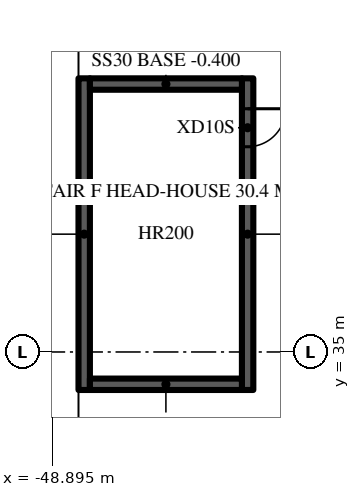
"""IFC4 building model, lengths in metres.
Left out: names, types, materials, properties, quantities, classifications, styles, units other than length and angle.
Written with IfcOpenShell. Run it as: python <this file> out.ifc"""

import sys

from ifc_helpers import new_model, si_unit, direction, frame, frame_2d, origin, place, context, subcontext, project, spatial, rectangle, extrude, element, fill, save


model = new_model("IFC4")
c1 = context("Model", 3, precision=1e-05, world=origin(), true_north=direction((0.0, 1.0)))
c2 = subcontext(c1, "Body", "Model", "MODEL_VIEW")
j1 = project(units=[si_unit("LENGTHUNIT", "METRE"), si_unit("PLANEANGLEUNIT", "RADIAN")], contexts=[c1])
p1 = place(None, origin())
s1 = spatial("IfcSite", under=j1, at=p1, CompositionType="ELEMENT")
p2 = place(p1, origin())
s2 = spatial("IfcBuilding", under=s1, at=p2, CompositionType="ELEMENT")
p3 = place(p2, origin())
s3 = spatial("IfcBuildingStorey", under=s2, at=p3, CompositionType="ELEMENT", Elevation=0.0)
p4 = place(p3, frame((-43.75, 42.2, -0.4), z_axis=(0.0, 0.0, 1.0), x_axis=(0.0, -1.0, 0.0)))
e1 = element("IfcWall", 1, at=p4, inside=s3, PredefinedType="SOLIDWALL", context=c2, shape_type="SweptSolid", body=[
    extrude(rectangle(XDim=8.2, YDim=0.3, at=frame_2d((4.1, 0.0))), origin(), (0.0, 0.0, 1.0), 3.6),
])
p5 = place(p4, frame((0.8, 0.0, 0.4)))
e2 = element("IfcOpeningElement", 2, at=p5, cuts=e1, PredefinedType="OPENING", context=c2, shape_type="SweptSolid", body=[
    extrude(rectangle(XDim=1.0, YDim=2.2, at=frame_2d((0.5, 1.1))), frame((0.0, 0.16, 0.0), z_axis=(0.0, -1.0, 0.0), x_axis=(1.0, 0.0, 0.0)), (0.0, 0.0, 1.0), 0.32),
])
p6 = place(p3, frame((-48.05, 34.0, -0.4), z_axis=(0.0, 0.0, 1.0), x_axis=(0.0, 1.0, 0.0)))
e3 = element("IfcWall", 3, at=p6, inside=s3, PredefinedType="SOLIDWALL", context=c2, shape_type="SweptSolid", body=[
    extrude(rectangle(XDim=8.2, YDim=0.3, at=frame_2d((4.1, 0.0))), origin(), (0.0, 0.0, 1.0), 3.6),
])
for number, where, z_axis, x_axis in (
    (4, (-43.9, 42.05, -0.4), (0.0, 0.0, 1.0), (-1.0, 0.0, 0.0)),
    (5, (-47.9, 34.15, -0.4), (0.0, 0.0, 1.0), (1.0, 0.0, 0.0)),
):
    element("IfcWall", number, at=place(p3, frame(where, z_axis=z_axis, x_axis=x_axis)), inside=s3, PredefinedType="SOLIDWALL", context=c2, shape_type="SweptSolid", body=[
        extrude(rectangle(XDim=4.0, YDim=0.3, at=frame_2d((2.0, 0.0))), origin(), (0.0, 0.0, 1.0), 3.6),
    ])
p7 = place(p5, origin())
e6 = element("IfcDoor", 6, at=p7, inside=s3, OperationType="SINGLE_SWING_LEFT", PredefinedType="DOOR", context=c2, shape_type="SweptSolid", body=[
    extrude(rectangle(XDim=1.0, YDim=2.2, at=frame_2d((0.5, 1.1))), frame((0.0, 0.025, 0.0), z_axis=(0.0, -1.0, 0.0), x_axis=(1.0, 0.0, 0.0)), (0.0, 0.0, 1.0), 0.05),
])
fill(e2, e6)
save(model, sys.argv[1])
